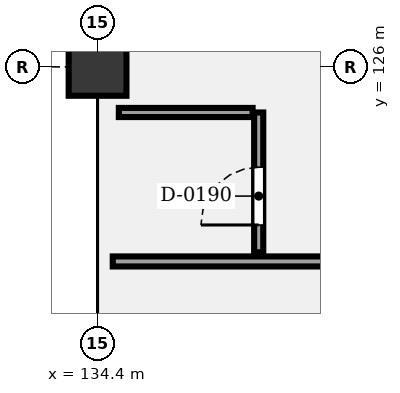
"""IFC4 building model, lengths in metres.
Left out: names, types, materials, properties, quantities, classifications, styles, units other than length and angle.
Written with IfcOpenShell. Run it as: python <this file> out.ifc"""

import sys

from ifc_helpers import new_model, si_unit, direction, frame, frame_2d, origin, origin_2d, place, context, subcontext, project, spatial, rectangle, extrude, element, fill, save


model = new_model("IFC4")
c1 = context("Model", 3, precision=1e-05, world=origin(), true_north=direction((0.0, 1.0)))
c2 = subcontext(c1, "Body", "Model", "MODEL_VIEW")
j1 = project(units=[si_unit("LENGTHUNIT", "METRE"), si_unit("PLANEANGLEUNIT", "RADIAN")], contexts=[c1])
p1 = place(None, origin())
s1 = spatial("IfcSite", under=j1, at=p1, CompositionType="ELEMENT")
p2 = place(p1, origin())
s2 = spatial("IfcBuilding", under=s1, at=p2, CompositionType="ELEMENT")
p3 = place(p2, frame((0.0, 0.0, 5.1)))
s3 = spatial("IfcBuildingStorey", under=s2, at=p3, CompositionType="ELEMENT", Elevation=5.1)
p4 = place(p3, frame((134.4, 126.0, 0.0), z_axis=(0.0, 0.0, 1.0), x_axis=(1.0, 0.0, 0.0)))
e1 = element("IfcColumn", 1, at=p4, inside=s3, PredefinedType="COLUMN", context=c2, shape_type="SweptSolid", body=[
    extrude(rectangle(XDim=0.95, YDim=0.95, at=origin_2d()), origin(), (0.0, 0.0, 1.0), 4.8),
])
p5 = place(p3, frame((134.65, 122.8, 0.0), z_axis=(0.0, 0.0, 1.0), x_axis=(1.0, 0.0, 0.0)))
e2 = element("IfcWall", 2, at=p5, inside=s3, PredefinedType="PARTITIONING", context=c2, shape_type="SweptSolid", body=[
    extrude(rectangle(XDim=8.5, YDim=0.165, at=frame_2d((4.25, 0.0))), origin(), (0.0, 0.0, 1.0), 3.68),
])
p6 = place(p5, frame((4.75, 0.0, 0.0)))
e3 = element("IfcOpeningElement", 3, at=p6, cuts=e2, PredefinedType="OPENING", context=c2, shape_type="SweptSolid", body=[
    extrude(rectangle(XDim=1.25, YDim=2.2, at=frame_2d((0.625, 1.1))), frame((0.0, 0.093, 0.0), z_axis=(0.0, -1.0, 0.0), x_axis=(1.0, 0.0, 0.0)), (0.0, 0.0, 1.0), 0.185),
])
p7 = place(p3, frame((137.05, 122.95, 0.0), z_axis=(0.0, 0.0, 1.0), x_axis=(0.0, 1.0, 0.0)))
e4 = element("IfcWall", 4, at=p7, inside=s3, PredefinedType="PARTITIONING", context=c2, shape_type="SweptSolid", body=[
    extrude(rectangle(XDim=2.3, YDim=0.15, at=frame_2d((1.15, 0.0))), origin(), (0.0, 0.0, 1.0), 3.68),
])
p8 = place(p7, frame((0.45, 0.0, 0.0)))
e5 = element("IfcOpeningElement", 5, at=p8, cuts=e4, PredefinedType="OPENING", context=c2, shape_type="SweptSolid", body=[
    extrude(rectangle(XDim=0.95, YDim=2.1, at=frame_2d((0.475, 1.05))), frame((0.0, 0.085, 0.0), z_axis=(0.0, -1.0, 0.0), x_axis=(1.0, 0.0, 0.0)), (0.0, 0.0, 1.0), 0.17),
])
p9 = place(p3, frame((134.75, 125.25, 0.0), z_axis=(0.0, 0.0, 1.0), x_axis=(1.0, 0.0, 0.0)))
e6 = element("IfcWall", 6, at=p9, inside=s3, PredefinedType="PARTITIONING", context=c2, shape_type="SweptSolid", body=[
    extrude(rectangle(XDim=2.2, YDim=0.15, at=frame_2d((1.1, 0.0))), origin(), (0.0, 0.0, 1.0), 3.68),
])
p10 = place(p8, origin())
e7 = element("IfcDoor", 7, at=p10, inside=s3, OperationType="SINGLE_SWING_LEFT", PredefinedType="DOOR", context=c2, shape_type="SweptSolid", body=[
    extrude(rectangle(XDim=0.95, YDim=2.1, at=frame_2d((0.475, 1.05))), frame((0.0, 0.025, 0.0), z_axis=(0.0, -1.0, 0.0), x_axis=(1.0, 0.0, 0.0)), (0.0, 0.0, 1.0), 0.05),
])
fill(e5, e7)
save(model, sys.argv[1])
